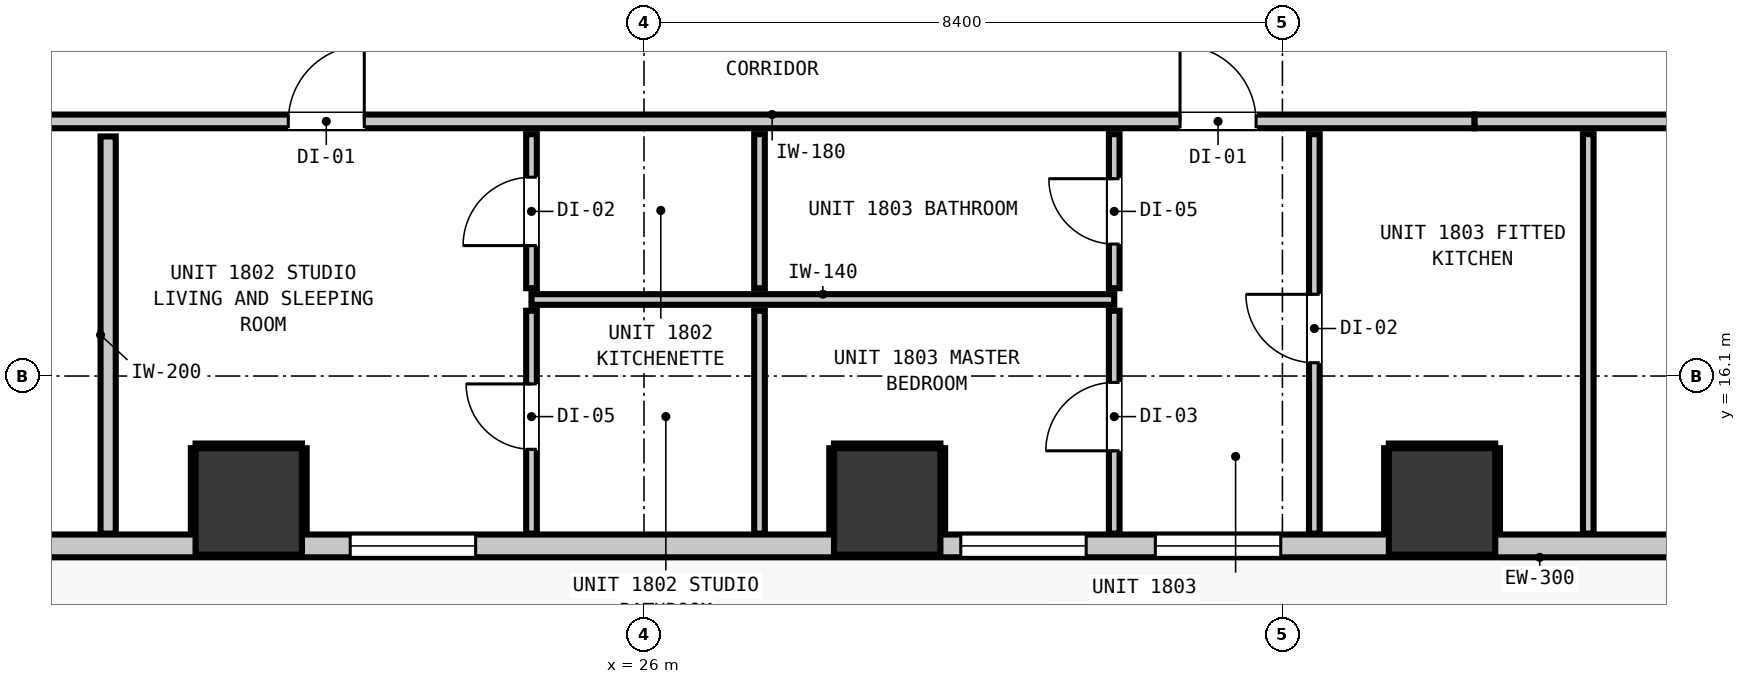
"""IFC4 building model, lengths in metres.
Left out: names, types, materials, properties, quantities, classifications, styles, units other than length and angle.
Written with IfcOpenShell. Run it as: python <this file> out.ifc"""

import sys

from ifc_helpers import new_model, si_unit, direction, frame, frame_2d, origin, origin_2d, place, context, subcontext, project, spatial, rectangle, extrude, element, fill, save


model = new_model("IFC4")
c1 = context("Model", 3, precision=1e-05, world=origin(), true_north=direction((0.0, 1.0)))
c2 = subcontext(c1, "Body", "Model", "MODEL_VIEW")
j1 = project(units=[si_unit("LENGTHUNIT", "METRE"), si_unit("PLANEANGLEUNIT", "RADIAN")], contexts=[c1])
p1 = place(None, origin())
s1 = spatial("IfcSite", under=j1, at=p1, CompositionType="ELEMENT")
p2 = place(p1, origin())
s2 = spatial("IfcBuilding", under=s1, at=p2, CompositionType="ELEMENT")
p3 = place(p2, frame((0.0, 0.0, 65.16)))
s3 = spatial("IfcBuildingStorey", under=s2, at=p3, CompositionType="ELEMENT", Elevation=65.16)
for number, where, z_axis, x_axis in (
    (1, (20.8, 14.45, 0.0), (0.0, 0.0, 1.0), (1.0, 0.0, 0.0)),
    (2, (29.2, 14.45, 0.0), (0.0, 0.0, 1.0), (1.0, 0.0, 0.0)),
    (3, (36.5, 14.45, 0.0), (0.0, 0.0, 1.0), (1.0, 0.0, 0.0)),
):
    element("IfcColumn", number, at=place(p3, frame(where, z_axis=z_axis, x_axis=x_axis)), inside=s3, PredefinedType="COLUMN", context=c2, shape_type="SweptSolid", body=[
        extrude(rectangle(XDim=1.4, YDim=1.4, at=origin_2d()), origin(), (0.0, 0.0, 1.0), 3.32),
    ])
p4 = place(p3, frame((47.835, 13.865, 0.0), z_axis=(0.0, 0.0, 1.0), x_axis=(-1.0, 0.0, 0.0)))
e4 = element("IfcWall", 4, at=p4, inside=s3, PredefinedType="STANDARD", context=c2, shape_type="SweptSolid", body=[
    extrude(rectangle(XDim=37.47, YDim=0.3, at=frame_2d((18.735, 0.0))), origin(), (0.0, 0.0, 1.0), 3.06),
])
p5 = place(p4, frame((1.251, 0.0, 0.0)))
e5 = element("IfcOpeningElement", 5, at=p5, cuts=e4, PredefinedType="OPENING", context=c2, shape_type="SweptSolid", body=[
    extrude(rectangle(XDim=1.0, YDim=2.15, at=frame_2d((0.5, 1.075))), frame((0.0, 0.16, 0.0), z_axis=(0.0, -1.0, 0.0), x_axis=(1.0, 0.0, 0.0)), (0.0, 0.0, 1.0), 0.32),
])
p6 = place(p4, frame((30.45, 0.0, 0.85)))
e6 = element("IfcOpeningElement", 6, at=p6, cuts=e4, PredefinedType="OPENING", context=c2, shape_type="SweptSolid", body=[
    extrude(rectangle(XDim=1.65, YDim=1.75, at=frame_2d((0.825, 0.875))), frame((0.0, 0.16, 0.0), z_axis=(0.0, -1.0, 0.0), x_axis=(1.0, 0.0, 0.0)), (0.0, 0.0, 1.0), 0.32),
])
p7 = place(p4, frame((24.05, 0.0, 0.85)))
e7 = element("IfcOpeningElement", 7, at=p7, cuts=e4, PredefinedType="OPENING", context=c2, shape_type="SweptSolid", body=[
    extrude(rectangle(XDim=1.65, YDim=1.75, at=frame_2d((0.825, 0.875))), frame((0.0, 0.16, 0.0), z_axis=(0.0, -1.0, 0.0), x_axis=(1.0, 0.0, 0.0)), (0.0, 0.0, 1.0), 0.32),
])
p8 = place(p4, frame((13.457, 0.0, 0.85)))
e8 = element("IfcOpeningElement", 8, at=p8, cuts=e4, PredefinedType="OPENING", context=c2, shape_type="SweptSolid", body=[
    extrude(rectangle(XDim=1.65, YDim=1.75, at=frame_2d((0.825, 0.875))), frame((0.0, 0.16, 0.0), z_axis=(0.0, -1.0, 0.0), x_axis=(1.0, 0.0, 0.0)), (0.0, 0.0, 1.0), 0.32),
])
p9 = place(p4, frame((16.017, 0.0, 0.85)))
e9 = element("IfcOpeningElement", 9, at=p9, cuts=e4, PredefinedType="OPENING", context=c2, shape_type="SweptSolid", body=[
    extrude(rectangle(XDim=1.65, YDim=1.75, at=frame_2d((0.825, 0.875))), frame((0.0, 0.16, 0.0), z_axis=(0.0, -1.0, 0.0), x_axis=(1.0, 0.0, 0.0)), (0.0, 0.0, 1.0), 0.32),
])
p10 = place(p4, frame((4.992, 0.0, 0.85)))
e10 = element("IfcOpeningElement", 10, at=p10, cuts=e4, PredefinedType="OPENING", context=c2, shape_type="SweptSolid", body=[
    extrude(rectangle(XDim=1.65, YDim=1.75, at=frame_2d((0.825, 0.875))), frame((0.0, 0.16, 0.0), z_axis=(0.0, -1.0, 0.0), x_axis=(1.0, 0.0, 0.0)), (0.0, 0.0, 1.0), 0.32),
])
p11 = place(p3, frame((8.027, 19.45, 0.0), z_axis=(0.0, 0.0, 1.0), x_axis=(1.0, 0.0, 0.0)))
e11 = element("IfcWall", 11, at=p11, inside=s3, PredefinedType="PARTITIONING", context=c2, shape_type="SweptSolid", body=[
    extrude(rectangle(XDim=28.902, YDim=0.18, at=frame_2d((14.451, 0.0))), origin(), (0.0, 0.0, 1.0), 3.06),
])
p12 = place(p11, frame((6.533, 0.0, 0.0)))
e12 = element("IfcOpeningElement", 12, at=p12, cuts=e11, PredefinedType="OPENING", context=c2, shape_type="SweptSolid", body=[
    extrude(rectangle(XDim=1.0, YDim=2.15, at=frame_2d((0.5, 1.075))), frame((0.0, 0.1, 0.0), z_axis=(0.0, -1.0, 0.0), x_axis=(1.0, 0.0, 0.0)), (0.0, 0.0, 1.0), 0.2),
])
p13 = place(p11, frame((13.293, 0.0, 0.0)))
e13 = element("IfcOpeningElement", 13, at=p13, cuts=e11, PredefinedType="OPENING", context=c2, shape_type="SweptSolid", body=[
    extrude(rectangle(XDim=1.0, YDim=2.15, at=frame_2d((0.5, 1.075))), frame((0.0, 0.1, 0.0), z_axis=(0.0, -1.0, 0.0), x_axis=(1.0, 0.0, 0.0)), (0.0, 0.0, 1.0), 0.2),
])
p14 = place(p11, frame((25.026, 0.0, 0.0)))
e14 = element("IfcOpeningElement", 14, at=p14, cuts=e11, PredefinedType="OPENING", context=c2, shape_type="SweptSolid", body=[
    extrude(rectangle(XDim=1.0, YDim=2.15, at=frame_2d((0.5, 1.075))), frame((0.0, 0.1, 0.0), z_axis=(0.0, -1.0, 0.0), x_axis=(1.0, 0.0, 0.0)), (0.0, 0.0, 1.0), 0.2),
])
p15 = place(p3, frame((36.929, 19.45, 0.0), z_axis=(0.0, 0.0, 1.0), x_axis=(1.0, 0.0, 0.0)))
e15 = element("IfcWall", 15, at=p15, inside=s3, PredefinedType="PARTITIONING", context=c2, shape_type="SweptSolid", body=[
    extrude(rectangle(XDim=12.392, YDim=0.18, at=frame_2d((6.196, 0.0))), origin(), (0.0, 0.0, 1.0), 2.445),
])
p16 = place(p15, frame((5.447, 0.0, 0.0)))
e16 = element("IfcOpeningElement", 16, at=p16, cuts=e15, PredefinedType="OPENING", context=c2, shape_type="SweptSolid", body=[
    extrude(rectangle(XDim=1.0, YDim=2.15, at=frame_2d((0.5, 1.075))), frame((0.0, 0.1, 0.0), z_axis=(0.0, -1.0, 0.0), x_axis=(1.0, 0.0, 0.0)), (0.0, 0.0, 1.0), 0.2),
])
p17 = place(p3, frame((24.52, 17.107, 0.0), z_axis=(0.0, 0.0, 1.0), x_axis=(1.0, 0.0, 0.0)))
e17 = element("IfcWall", 17, at=p17, inside=s3, PredefinedType="PARTITIONING", context=c2, shape_type="SweptSolid", body=[
    extrude(rectangle(XDim=7.667, YDim=0.14, at=frame_2d((3.833, 0.0))), origin(), (0.0, 0.0, 1.0), 3.06),
])
p18 = place(p3, frame((18.95, 14.027, 0.0), z_axis=(0.0, 0.0, 1.0), x_axis=(0.0, 1.0, 0.0)))
e18 = element("IfcWall", 18, at=p18, inside=s3, PredefinedType="PARTITIONING", context=c2, shape_type="SweptSolid", body=[
    extrude(rectangle(XDim=5.225, YDim=0.2, at=frame_2d((2.612, 0.0))), origin(), (0.0, 0.0, 1.0), 3.06),
])
p19 = place(p3, frame((24.52, 14.027, 0.0), z_axis=(0.0, 0.0, 1.0), x_axis=(0.0, 1.0, 0.0)))
e19 = element("IfcWall", 19, at=p19, inside=s3, PredefinedType="PARTITIONING", context=c2, shape_type="SweptSolid", body=[
    extrude(rectangle(XDim=2.932, YDim=0.14, at=frame_2d((1.466, 0.0))), origin(), (0.0, 0.0, 1.0), 3.06),
])
p20 = place(p19, frame((1.109, 0.0, 0.0)))
e20 = element("IfcOpeningElement", 20, at=p20, cuts=e19, PredefinedType="OPENING", context=c2, shape_type="SweptSolid", body=[
    extrude(rectangle(XDim=0.86, YDim=2.02, at=frame_2d((0.43, 1.01))), frame((0.0, 0.08, 0.0), z_axis=(0.0, -1.0, 0.0), x_axis=(1.0, 0.0, 0.0)), (0.0, 0.0, 1.0), 0.16),
])
p21 = place(p3, frame((24.52, 17.255, 0.0), z_axis=(0.0, 0.0, 1.0), x_axis=(0.0, 1.0, 0.0)))
e21 = element("IfcWall", 21, at=p21, inside=s3, PredefinedType="PARTITIONING", context=c2, shape_type="SweptSolid", body=[
    extrude(rectangle(XDim=2.027, YDim=0.14, at=frame_2d((1.014, 0.0))), origin(), (0.0, 0.0, 1.0), 3.06),
])
p22 = place(p21, frame((0.561, 0.0, 0.0)))
e22 = element("IfcOpeningElement", 22, at=p22, cuts=e21, PredefinedType="OPENING", context=c2, shape_type="SweptSolid", body=[
    extrude(rectangle(XDim=0.9, YDim=2.1, at=frame_2d((0.45, 1.05))), frame((0.0, 0.08, 0.0), z_axis=(0.0, -1.0, 0.0), x_axis=(1.0, 0.0, 0.0)), (0.0, 0.0, 1.0), 0.16),
])
p23 = place(p3, frame((27.52, 14.027, 0.0), z_axis=(0.0, 0.0, 1.0), x_axis=(0.0, 1.0, 0.0)))
e23 = element("IfcWall", 23, at=p23, inside=s3, PredefinedType="PARTITIONING", context=c2, shape_type="SweptSolid", body=[
    extrude(rectangle(XDim=2.932, YDim=0.14, at=frame_2d((1.466, 0.0))), origin(), (0.0, 0.0, 1.0), 3.06),
])
p24 = place(p3, frame((27.52, 17.255, 0.0), z_axis=(0.0, 0.0, 1.0), x_axis=(0.0, 1.0, 0.0)))
e24 = element("IfcWall", 24, at=p24, inside=s3, PredefinedType="PARTITIONING", context=c2, shape_type="SweptSolid", body=[
    extrude(rectangle(XDim=2.027, YDim=0.14, at=frame_2d((1.014, 0.0))), origin(), (0.0, 0.0, 1.0), 3.06),
])
p25 = place(p3, frame((32.187, 14.027, 0.0), z_axis=(0.0, 0.0, 1.0), x_axis=(0.0, 1.0, 0.0)))
e25 = element("IfcWall", 25, at=p25, inside=s3, PredefinedType="PARTITIONING", context=c2, shape_type="SweptSolid", body=[
    extrude(rectangle(XDim=2.932, YDim=0.14, at=frame_2d((1.466, 0.0))), origin(), (0.0, 0.0, 1.0), 3.06),
])
p26 = place(p25, frame((1.089, 0.0, 0.0)))
e26 = element("IfcOpeningElement", 26, at=p26, cuts=e25, PredefinedType="OPENING", context=c2, shape_type="SweptSolid", body=[
    extrude(rectangle(XDim=0.9, YDim=2.1, at=frame_2d((0.45, 1.05))), frame((0.0, 0.08, 0.0), z_axis=(0.0, -1.0, 0.0), x_axis=(1.0, 0.0, 0.0)), (0.0, 0.0, 1.0), 0.16),
])
p27 = place(p3, frame((32.187, 17.255, 0.0), z_axis=(0.0, 0.0, 1.0), x_axis=(0.0, 1.0, 0.0)))
e27 = element("IfcWall", 27, at=p27, inside=s3, PredefinedType="PARTITIONING", context=c2, shape_type="SweptSolid", body=[
    extrude(rectangle(XDim=2.027, YDim=0.14, at=frame_2d((1.014, 0.0))), origin(), (0.0, 0.0, 1.0), 3.06),
])
p28 = place(p27, frame((0.581, 0.0, 0.0)))
e28 = element("IfcOpeningElement", 28, at=p28, cuts=e27, PredefinedType="OPENING", context=c2, shape_type="SweptSolid", body=[
    extrude(rectangle(XDim=0.86, YDim=2.02, at=frame_2d((0.43, 1.01))), frame((0.0, 0.08, 0.0), z_axis=(0.0, -1.0, 0.0), x_axis=(1.0, 0.0, 0.0)), (0.0, 0.0, 1.0), 0.16),
])
p29 = place(p3, frame((34.82, 14.027, 0.0), z_axis=(0.0, 0.0, 1.0), x_axis=(0.0, 1.0, 0.0)))
e29 = element("IfcWall", 29, at=p29, inside=s3, PredefinedType="PARTITIONING", context=c2, shape_type="SweptSolid", body=[
    extrude(rectangle(XDim=5.255, YDim=0.14, at=frame_2d((2.627, 0.0))), origin(), (0.0, 0.0, 1.0), 3.06),
])
p30 = place(p29, frame((2.248, 0.0, 0.0)))
e30 = element("IfcOpeningElement", 30, at=p30, cuts=e29, PredefinedType="OPENING", context=c2, shape_type="SweptSolid", body=[
    extrude(rectangle(XDim=0.9, YDim=2.1, at=frame_2d((0.45, 1.05))), frame((0.0, 0.08, 0.0), z_axis=(0.0, -1.0, 0.0), x_axis=(1.0, 0.0, 0.0)), (0.0, 0.0, 1.0), 0.16),
])
p31 = place(p3, frame((38.424, 14.027, 0.0), z_axis=(0.0, 0.0, 1.0), x_axis=(0.0, 1.0, 0.0)))
e31 = element("IfcWall", 31, at=p31, inside=s3, PredefinedType="PARTITIONING", context=c2, shape_type="SweptSolid", body=[
    extrude(rectangle(XDim=5.255, YDim=0.14, at=frame_2d((2.627, 0.0))), origin(), (0.0, 0.0, 1.0), 3.06),
])
p32 = place(p3, frame((20.1, 15.182, 0.0), z_axis=(0.0, 0.0, 1.0), x_axis=(1.0, 0.0, 0.0)))
e32 = element("IfcWall", 32, at=p32, inside=s3, PredefinedType="PARTITIONING", context=c2, shape_type="SweptSolid", body=[
    extrude(rectangle(XDim=1.4, YDim=0.06, at=frame_2d((0.7, 0.0))), origin(), (0.0, 0.0, 1.0), 1.45),
])
for number, where, z_axis, x_axis in (
    (33, (20.068, 14.03, 0.0), (0.0, 0.0, 1.0), (0.0, 1.0, 0.0)),
    (34, (21.532, 14.03, 0.0), (0.0, 0.0, 1.0), (0.0, 1.0, 0.0)),
):
    element("IfcWall", number, at=place(p3, frame(where, z_axis=z_axis, x_axis=x_axis)), inside=s3, PredefinedType="PARTITIONING", context=c2, shape_type="SweptSolid", body=[
        extrude(rectangle(XDim=1.12, YDim=0.06, at=frame_2d((0.56, 0.0))), origin(), (0.0, 0.0, 1.0), 1.45),
    ])
p33 = place(p3, frame((28.5, 15.182, 0.0), z_axis=(0.0, 0.0, 1.0), x_axis=(1.0, 0.0, 0.0)))
e35 = element("IfcWall", 35, at=p33, inside=s3, PredefinedType="PARTITIONING", context=c2, shape_type="SweptSolid", body=[
    extrude(rectangle(XDim=1.4, YDim=0.06, at=frame_2d((0.7, 0.0))), origin(), (0.0, 0.0, 1.0), 1.45),
])
for number, where, z_axis, x_axis in (
    (36, (28.468, 14.03, 0.0), (0.0, 0.0, 1.0), (0.0, 1.0, 0.0)),
    (37, (29.932, 14.03, 0.0), (0.0, 0.0, 1.0), (0.0, 1.0, 0.0)),
):
    element("IfcWall", number, at=place(p3, frame(where, z_axis=z_axis, x_axis=x_axis)), inside=s3, PredefinedType="PARTITIONING", context=c2, shape_type="SweptSolid", body=[
        extrude(rectangle(XDim=1.12, YDim=0.06, at=frame_2d((0.56, 0.0))), origin(), (0.0, 0.0, 1.0), 1.45),
    ])
p34 = place(p3, frame((35.8, 15.182, 0.0), z_axis=(0.0, 0.0, 1.0), x_axis=(1.0, 0.0, 0.0)))
e38 = element("IfcWall", 38, at=p34, inside=s3, PredefinedType="PARTITIONING", context=c2, shape_type="SweptSolid", body=[
    extrude(rectangle(XDim=1.4, YDim=0.06, at=frame_2d((0.7, 0.0))), origin(), (0.0, 0.0, 1.0), 1.45),
])
for number, where, z_axis, x_axis in (
    (39, (35.768, 14.03, 0.0), (0.0, 0.0, 1.0), (0.0, 1.0, 0.0)),
    (40, (37.232, 14.03, 0.0), (0.0, 0.0, 1.0), (0.0, 1.0, 0.0)),
):
    element("IfcWall", number, at=place(p3, frame(where, z_axis=z_axis, x_axis=x_axis)), inside=s3, PredefinedType="PARTITIONING", context=c2, shape_type="SweptSolid", body=[
        extrude(rectangle(XDim=1.12, YDim=0.06, at=frame_2d((0.56, 0.0))), origin(), (0.0, 0.0, 1.0), 1.45),
    ])
p35 = place(p7, origin())
e41 = element("IfcWindow", 41, at=p35, inside=s3, PartitioningType="SINGLE_PANEL", PredefinedType="WINDOW", context=c2, shape_type="SweptSolid", body=[
    extrude(rectangle(XDim=1.65, YDim=1.75, at=frame_2d((0.825, 0.875))), frame((0.0, 0.03, 0.0), z_axis=(0.0, -1.0, 0.0), x_axis=(1.0, 0.0, 0.0)), (0.0, 0.0, 1.0), 0.06),
])
fill(e7, e41)
p36 = place(p8, origin())
e42 = element("IfcWindow", 42, at=p36, inside=s3, PartitioningType="SINGLE_PANEL", PredefinedType="WINDOW", context=c2, shape_type="SweptSolid", body=[
    extrude(rectangle(XDim=1.65, YDim=1.75, at=frame_2d((0.825, 0.875))), frame((0.0, 0.03, 0.0), z_axis=(0.0, -1.0, 0.0), x_axis=(1.0, 0.0, 0.0)), (0.0, 0.0, 1.0), 0.06),
])
fill(e8, e42)
p37 = place(p9, origin())
e43 = element("IfcWindow", 43, at=p37, inside=s3, PartitioningType="SINGLE_PANEL", PredefinedType="WINDOW", context=c2, shape_type="SweptSolid", body=[
    extrude(rectangle(XDim=1.65, YDim=1.75, at=frame_2d((0.825, 0.875))), frame((0.0, 0.03, 0.0), z_axis=(0.0, -1.0, 0.0), x_axis=(1.0, 0.0, 0.0)), (0.0, 0.0, 1.0), 0.06),
])
fill(e9, e43)
p38 = place(p13, origin())
e44 = element("IfcDoor", 44, at=p38, inside=s3, OperationType="SINGLE_SWING_RIGHT", PredefinedType="DOOR", context=c2, shape_type="SweptSolid", body=[
    extrude(rectangle(XDim=1.0, YDim=2.15, at=frame_2d((0.5, 1.075))), frame((0.0, 0.025, 0.0), z_axis=(0.0, -1.0, 0.0), x_axis=(1.0, 0.0, 0.0)), (0.0, 0.0, 1.0), 0.05),
])
fill(e13, e44)
p39 = place(p22, origin())
e45 = element("IfcDoor", 45, at=p39, inside=s3, OperationType="SINGLE_SWING_LEFT", PredefinedType="DOOR", context=c2, shape_type="SweptSolid", body=[
    extrude(rectangle(XDim=0.9, YDim=2.1, at=frame_2d((0.45, 1.05))), frame((0.0, 0.025, 0.0), z_axis=(0.0, -1.0, 0.0), x_axis=(1.0, 0.0, 0.0)), (0.0, 0.0, 1.0), 0.05),
])
fill(e22, e45)
p40 = place(p20, origin())
e46 = element("IfcDoor", 46, at=p40, inside=s3, OperationType="SINGLE_SWING_RIGHT", PredefinedType="DOOR", context=c2, shape_type="SweptSolid", body=[
    extrude(rectangle(XDim=0.86, YDim=2.02, at=frame_2d((0.43, 1.01))), frame((0.0, 0.025, 0.0), z_axis=(0.0, -1.0, 0.0), x_axis=(1.0, 0.0, 0.0)), (0.0, 0.0, 1.0), 0.05),
])
fill(e20, e46)
p41 = place(p14, origin())
e47 = element("IfcDoor", 47, at=p41, inside=s3, OperationType="SINGLE_SWING_LEFT", PredefinedType="DOOR", context=c2, shape_type="SweptSolid", body=[
    extrude(rectangle(XDim=1.0, YDim=2.15, at=frame_2d((0.5, 1.075))), frame((0.0, 0.025, 0.0), z_axis=(0.0, -1.0, 0.0), x_axis=(1.0, 0.0, 0.0)), (0.0, 0.0, 1.0), 0.05),
])
fill(e14, e47)
p42 = place(p28, origin())
e48 = element("IfcDoor", 48, at=p42, inside=s3, OperationType="SINGLE_SWING_RIGHT", PredefinedType="DOOR", context=c2, shape_type="SweptSolid", body=[
    extrude(rectangle(XDim=0.86, YDim=2.02, at=frame_2d((0.43, 1.01))), frame((0.0, 0.025, 0.0), z_axis=(0.0, -1.0, 0.0), x_axis=(1.0, 0.0, 0.0)), (0.0, 0.0, 1.0), 0.05),
])
fill(e28, e48)
p43 = place(p26, origin())
e49 = element("IfcDoor", 49, at=p43, inside=s3, OperationType="SINGLE_SWING_LEFT", PredefinedType="DOOR", context=c2, shape_type="SweptSolid", body=[
    extrude(rectangle(XDim=0.9, YDim=2.1, at=frame_2d((0.45, 1.05))), frame((0.0, 0.025, 0.0), z_axis=(0.0, -1.0, 0.0), x_axis=(1.0, 0.0, 0.0)), (0.0, 0.0, 1.0), 0.05),
])
fill(e26, e49)
p44 = place(p30, origin())
e50 = element("IfcDoor", 50, at=p44, inside=s3, OperationType="SINGLE_SWING_RIGHT", PredefinedType="DOOR", context=c2, shape_type="SweptSolid", body=[
    extrude(rectangle(XDim=0.9, YDim=2.1, at=frame_2d((0.45, 1.05))), frame((0.0, 0.025, 0.0), z_axis=(0.0, -1.0, 0.0), x_axis=(1.0, 0.0, 0.0)), (0.0, 0.0, 1.0), 0.05),
])
fill(e30, e50)
save(model, sys.argv[1])
